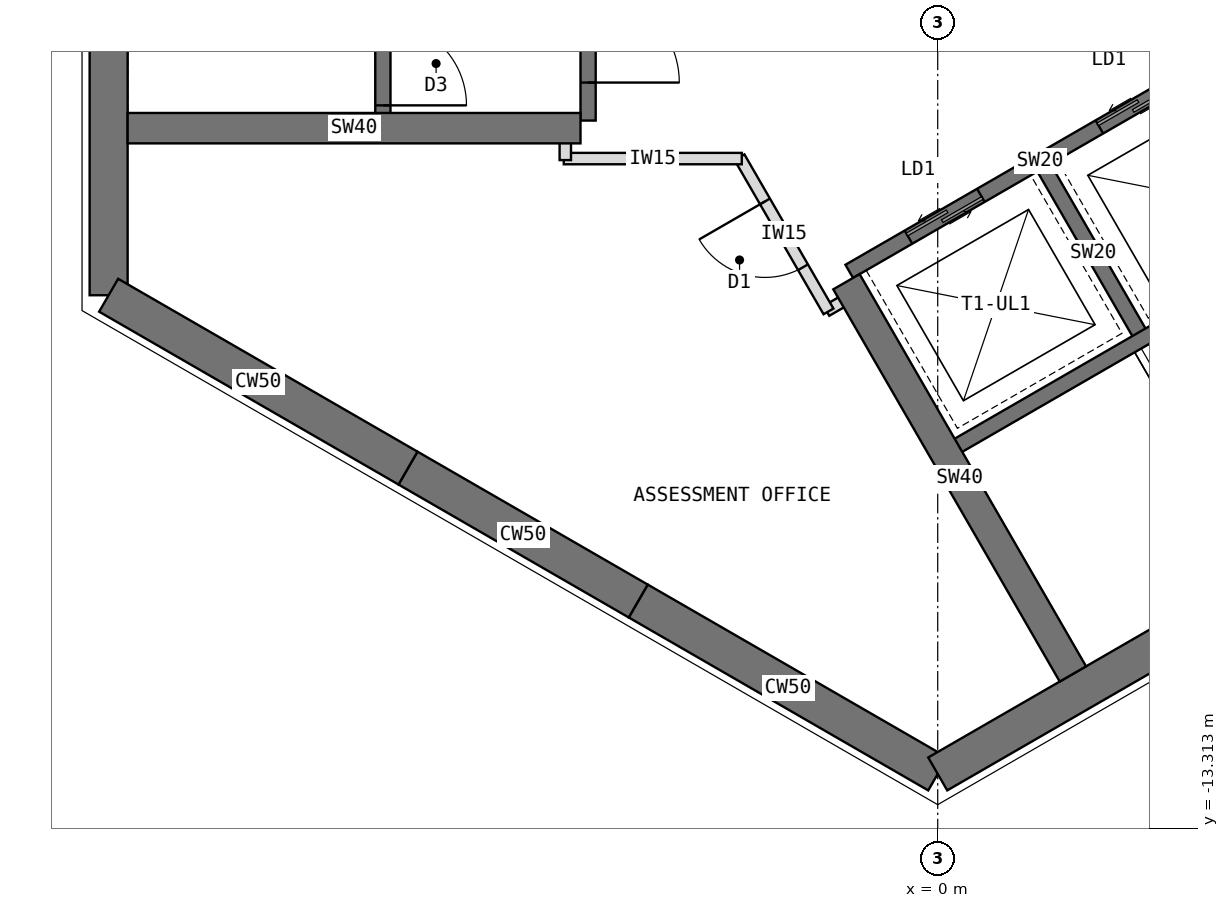
"""IFC4 building model, lengths in metres.
Left out: names, types, materials, properties, quantities, classifications, styles, units other than length and angle.
Written with IfcOpenShell. Run it as: python <this file> out.ifc"""

import sys

from ifc_helpers import new_model, si_unit, direction, frame, frame_2d, origin, place, context, subcontext, project, spatial, rectangle, extrude, element, fill, save


model = new_model("IFC4")
c1 = context("Model", 3, precision=1e-05, world=origin(), true_north=direction((0.0, 1.0)))
c2 = subcontext(c1, "Body", "Model", "MODEL_VIEW")
j1 = project(units=[si_unit("LENGTHUNIT", "METRE"), si_unit("PLANEANGLEUNIT", "RADIAN")], contexts=[c1])
p1 = place(None, origin())
s1 = spatial("IfcSite", under=j1, at=p1, CompositionType="ELEMENT")
p2 = place(p1, origin())
s2 = spatial("IfcBuilding", under=s1, at=p2, CompositionType="ELEMENT")
p3 = place(p2, frame((0.0, 0.0, 218.5)))
s3 = spatial("IfcBuildingStorey", under=s2, at=p3, CompositionType="ELEMENT", Elevation=218.5)
p4 = place(p3, frame((-10.908, 6.298, 0.0), z_axis=(0.0, 0.0, 1.0), x_axis=(0.0, -1.0, 0.0)))
e1 = element("IfcWall", 1, at=p4, inside=s3, PredefinedType="SHEAR", context=c2, shape_type="SweptSolid", body=[
    extrude(rectangle(XDim=12.596, YDim=0.5, at=frame_2d((6.298, 0.0))), origin(), (0.0, 0.0, 1.0), 4.0),
])
p5 = place(p3, frame((-10.908, -6.298, 0.0), z_axis=(0.0, 0.0, 1.0), x_axis=(0.866034513004, -0.499984222037, 0.0)))
e2 = element("IfcWall", 2, at=p5, inside=s3, PredefinedType="SHEAR", context=c2, shape_type="SweptSolid", body=[
    extrude(rectangle(XDim=4.548, YDim=0.5, at=frame_2d((2.274, 0.0))), origin(), (0.0, 0.0, 1.0), 4.0),
])
p6 = place(p3, frame((-6.97, -8.572, 0.0), z_axis=(0.0, 0.0, 1.0), x_axis=(0.866019471182, -0.500010275428, 0.0)))
e3 = element("IfcWall", 3, at=p6, inside=s3, PredefinedType="SHEAR", context=c2, shape_type="SweptSolid", body=[
    extrude(rectangle(XDim=3.5, YDim=0.5, at=frame_2d((1.75, 0.0))), origin(), (0.0, 0.0, 1.0), 4.0),
])
p7 = place(p3, frame((-3.939, -10.322, 0.0), z_axis=(0.0, 0.0, 1.0), x_axis=(0.866011268655, -0.500024481964, 0.0)))
e4 = element("IfcWall", 4, at=p7, inside=s3, PredefinedType="SHEAR", context=c2, shape_type="SweptSolid", body=[
    extrude(rectangle(XDim=4.548, YDim=0.5, at=frame_2d((2.274, 0.0))), origin(), (0.0, 0.0, 1.0), 4.0),
])
p8 = place(p3, frame((0.0, -12.596, 0.0), z_axis=(0.0, 0.0, 1.0), x_axis=(0.866021940709, 0.500005998175, 0.0)))
e5 = element("IfcWall", 5, at=p8, inside=s3, PredefinedType="SHEAR", context=c2, shape_type="SweptSolid", body=[
    extrude(rectangle(XDim=12.596, YDim=0.5, at=frame_2d((6.298, 0.0))), origin(), (0.0, 0.0, 1.0), 4.0),
])
p9 = place(p3, frame((-4.6, 4.0, 0.0), z_axis=(0.0, 0.0, 1.0), x_axis=(0.0, -1.0, 0.0)))
e6 = element("IfcWall", 6, at=p9, inside=s3, PredefinedType="SHEAR", context=c2, shape_type="SweptSolid", body=[
    extrude(rectangle(XDim=8.0, YDim=0.2, at=frame_2d((4.0, 0.0))), origin(), (0.0, 0.0, 1.0), 4.0),
])
p10 = place(p9, frame((6.3, 0.0, 0.0)))
e7 = element("IfcOpeningElement", 7, at=p10, cuts=e6, PredefinedType="OPENING", context=c2, shape_type="SweptSolid", body=[
    extrude(rectangle(XDim=1.2, YDim=2.1, at=frame_2d((0.6, 1.05))), frame((0.0, 0.11, 0.0), z_axis=(0.0, -1.0, 0.0), x_axis=(1.0, 0.0, 0.0)), (0.0, 0.0, 1.0), 0.22),
])
p11 = place(p9, frame((0.9, 0.0, 0.0)))
e8 = element("IfcOpeningElement", 8, at=p11, cuts=e6, PredefinedType="OPENING", context=c2, shape_type="SweptSolid", body=[
    extrude(rectangle(XDim=1.1, YDim=2.2, at=frame_2d((0.55, 1.1))), frame((0.0, 0.11, 0.0), z_axis=(0.0, -1.0, 0.0), x_axis=(1.0, 0.0, 0.0)), (0.0, 0.0, 1.0), 0.22),
])
p12 = place(p3, frame((-7.3, 4.0, 0.0), z_axis=(0.0, 0.0, 1.0), x_axis=(0.0, -1.0, 0.0)))
e9 = element("IfcWall", 9, at=p12, inside=s3, PredefinedType="SHEAR", context=c2, shape_type="SweptSolid", body=[
    extrude(rectangle(XDim=8.0, YDim=0.2, at=frame_2d((4.0, 0.0))), origin(), (0.0, 0.0, 1.0), 4.0),
])
p13 = place(p12, frame((6.7, 0.0, 0.0)))
e10 = element("IfcOpeningElement", 10, at=p13, cuts=e9, PredefinedType="OPENING", context=c2, shape_type="SweptSolid", body=[
    extrude(rectangle(XDim=1.1, YDim=2.1, at=frame_2d((0.55, 1.05))), frame((0.0, 0.11, 0.0), z_axis=(0.0, -1.0, 0.0), x_axis=(1.0, 0.0, 0.0)), (0.0, 0.0, 1.0), 0.22),
])
p14 = place(p3, frame((-4.7, -4.1, 0.0), z_axis=(0.0, 0.0, 1.0), x_axis=(-1.0, 0.0, 0.0)))
e11 = element("IfcWall", 11, at=p14, inside=s3, PredefinedType="SHEAR", context=c2, shape_type="SweptSolid", body=[
    extrude(rectangle(XDim=5.958, YDim=0.4, at=frame_2d((2.979, 0.0))), origin(), (0.0, 0.0, 1.0), 4.0),
])
p15 = place(p3, frame((-1.164, -5.984, 0.0), z_axis=(0.0, 0.0, 1.0), x_axis=(0.866026010844, 0.49999894854, 0.0)))
e12 = element("IfcWall", 12, at=p15, inside=s3, PredefinedType="SHEAR", context=c2, shape_type="SweptSolid", body=[
    extrude(rectangle(XDim=8.0, YDim=0.2, at=frame_2d((4.0, 0.0))), origin(), (0.0, 0.0, 1.0), 4.0),
])
p16 = place(p15, frame((6.3, 0.0, 0.0)))
e13 = element("IfcOpeningElement", 13, at=p16, cuts=e12, PredefinedType="OPENING", context=c2, shape_type="SweptSolid", body=[
    extrude(rectangle(XDim=1.2, YDim=2.1, at=frame_2d((0.6, 1.05))), frame((0.0, 0.11, 0.0), z_axis=(0.0, -1.0, 0.0), x_axis=(1.0, 0.0, 0.0)), (0.0, 0.0, 1.0), 0.22),
])
p17 = place(p15, frame((0.9, 0.0, 0.0)))
e14 = element("IfcOpeningElement", 14, at=p17, cuts=e12, PredefinedType="OPENING", context=c2, shape_type="SweptSolid", body=[
    extrude(rectangle(XDim=1.1, YDim=2.2, at=frame_2d((0.55, 1.1))), frame((0.0, 0.11, 0.0), z_axis=(0.0, -1.0, 0.0), x_axis=(1.0, 0.0, 0.0)), (0.0, 0.0, 1.0), 0.22),
])
p18 = place(p15, frame((3.8, 0.0, 0.0)))
e15 = element("IfcOpeningElement", 15, at=p18, cuts=e12, PredefinedType="OPENING", context=c2, shape_type="SweptSolid", body=[
    extrude(rectangle(XDim=1.1, YDim=2.2, at=frame_2d((0.55, 1.1))), frame((0.0, 0.11, 0.0), z_axis=(0.0, -1.0, 0.0), x_axis=(1.0, 0.0, 0.0)), (0.0, 0.0, 1.0), 0.22),
])
p19 = place(p3, frame((1.397, -4.62, 0.0), z_axis=(0.0, 0.0, 1.0), x_axis=(0.499936506574, -0.866062058628, 0.0)))
e16 = element("IfcWall", 16, at=p19, inside=s3, PredefinedType="SHEAR", context=c2, shape_type="SweptSolid", body=[
    extrude(rectangle(XDim=2.6, YDim=0.2, at=frame_2d((1.3, 0.0))), origin(), (0.0, 0.0, 1.0), 4.0),
])
p20 = place(p3, frame((0.186, -8.322, 0.0), z_axis=(0.0, 0.0, 1.0), x_axis=(0.866026010844, 0.49999894854, 0.0)))
e17 = element("IfcWall", 17, at=p20, inside=s3, PredefinedType="SHEAR", context=c2, shape_type="SweptSolid", body=[
    extrude(rectangle(XDim=8.0, YDim=0.2, at=frame_2d((4.0, 0.0))), origin(), (0.0, 0.0, 1.0), 4.0),
])
p21 = place(p20, frame((6.7, 0.0, 0.0)))
e18 = element("IfcOpeningElement", 18, at=p21, cuts=e17, PredefinedType="OPENING", context=c2, shape_type="SweptSolid", body=[
    extrude(rectangle(XDim=1.1, YDim=2.1, at=frame_2d((0.55, 1.05))), frame((0.0, 0.11, 0.0), z_axis=(0.0, -1.0, 0.0), x_axis=(1.0, 0.0, 0.0)), (0.0, 0.0, 1.0), 0.22),
])
p22 = place(p3, frame((-1.201, -6.12, 0.0), z_axis=(0.0, 0.0, 1.0), x_axis=(0.500021575205, -0.866012946976, 0.0)))
e19 = element("IfcWall", 19, at=p22, inside=s3, PredefinedType="SHEAR", context=c2, shape_type="SweptSolid", body=[
    extrude(rectangle(XDim=5.958, YDim=0.4, at=frame_2d((2.979, 0.0))), origin(), (0.0, 0.0, 1.0), 4.0),
])
p23 = place(p3, frame((-1.092, -6.289, 0.0), z_axis=(0.0, 0.0, 1.0), x_axis=(-0.866138304741, -0.499804398801, 0.0)))
e20 = element("IfcWall", 20, at=p23, inside=s3, PredefinedType="PARTITIONING", context=c2, shape_type="SweptSolid", body=[
    extrude(rectangle(XDim=0.43, YDim=0.15, at=frame_2d((0.215, 0.0))), origin(), (0.0, 0.0, 1.0), 3.8),
])
p24 = place(p3, frame((-1.437, -6.511, 0.0), z_axis=(0.0, 0.0, 1.0), x_axis=(-0.500074377092, 0.865982457891, 0.0)))
e21 = element("IfcWall", 21, at=p24, inside=s3, PredefinedType="PARTITIONING", context=c2, shape_type="SweptSolid", body=[
    extrude(rectangle(XDim=2.342, YDim=0.15, at=frame_2d((1.171, 0.0))), origin(), (0.0, 0.0, 1.0), 3.8),
])
p25 = place(p24, frame((0.671, 0.0, 0.0)))
e22 = element("IfcOpeningElement", 22, at=p25, cuts=e21, PredefinedType="OPENING", context=c2, shape_type="SweptSolid", body=[
    extrude(rectangle(XDim=1.0, YDim=2.1, at=frame_2d((0.5, 1.05))), frame((0.0, 0.085, 0.0), z_axis=(0.0, -1.0, 0.0), x_axis=(1.0, 0.0, 0.0)), (0.0, 0.0, 1.0), 0.17),
])
p26 = place(p3, frame((-2.578, -4.5, 0.0), z_axis=(0.0, 0.0, 1.0), x_axis=(-1.0, 0.0, 0.0)))
e23 = element("IfcWall", 23, at=p26, inside=s3, PredefinedType="PARTITIONING", context=c2, shape_type="SweptSolid", body=[
    extrude(rectangle(XDim=2.342, YDim=0.15, at=frame_2d((1.171, 0.0))), origin(), (0.0, 0.0, 1.0), 3.8),
])
p27 = place(p3, frame((-4.9, -4.52, 0.0), z_axis=(0.0, 0.0, 1.0), x_axis=(0.0, 1.0, 0.0)))
e24 = element("IfcWall", 24, at=p27, inside=s3, PredefinedType="PARTITIONING", context=c2, shape_type="SweptSolid", body=[
    extrude(rectangle(XDim=0.43, YDim=0.15, at=frame_2d((0.215, 0.0))), origin(), (0.0, 0.0, 1.0), 3.8),
])
p28 = place(p10, origin())
e25 = element("IfcDoor", 25, at=p28, inside=s3, OperationType="SINGLE_SWING_RIGHT", PredefinedType="DOOR", context=c2, shape_type="SweptSolid", body=[
    extrude(rectangle(XDim=1.2, YDim=2.1, at=frame_2d((0.6, 1.05))), frame((0.0, 0.025, 0.0), z_axis=(0.0, -1.0, 0.0), x_axis=(1.0, 0.0, 0.0)), (0.0, 0.0, 1.0), 0.05),
])
fill(e7, e25)
p29 = place(p13, origin())
e26 = element("IfcDoor", 26, at=p29, inside=s3, OperationType="SINGLE_SWING_RIGHT", PredefinedType="DOOR", context=c2, shape_type="SweptSolid", body=[
    extrude(rectangle(XDim=1.1, YDim=2.1, at=frame_2d((0.55, 1.05))), frame((0.0, 0.025, 0.0), z_axis=(0.0, -1.0, 0.0), x_axis=(1.0, 0.0, 0.0)), (0.0, 0.0, 1.0), 0.05),
])
fill(e10, e26)
p30 = place(p17, origin())
e27 = element("IfcDoor", 27, at=p30, inside=s3, OperationType="DOUBLE_DOOR_SLIDING", PredefinedType="DOOR", context=c2, shape_type="SweptSolid", body=[
    extrude(rectangle(XDim=1.1, YDim=2.2, at=frame_2d((0.55, 1.1))), frame((0.0, 0.025, 0.0), z_axis=(0.0, -1.0, 0.0), x_axis=(1.0, 0.0, 0.0)), (0.0, 0.0, 1.0), 0.05),
])
fill(e14, e27)
p31 = place(p18, origin())
e28 = element("IfcDoor", 28, at=p31, inside=s3, OperationType="DOUBLE_DOOR_SLIDING", PredefinedType="DOOR", context=c2, shape_type="SweptSolid", body=[
    extrude(rectangle(XDim=1.1, YDim=2.2, at=frame_2d((0.55, 1.1))), frame((0.0, 0.025, 0.0), z_axis=(0.0, -1.0, 0.0), x_axis=(1.0, 0.0, 0.0)), (0.0, 0.0, 1.0), 0.05),
])
fill(e15, e28)
p32 = place(p25, origin())
e29 = element("IfcDoor", 29, at=p32, inside=s3, OperationType="SINGLE_SWING_RIGHT", PredefinedType="DOOR", context=c2, shape_type="SweptSolid", body=[
    extrude(rectangle(XDim=1.0, YDim=2.1, at=frame_2d((0.5, 1.05))), frame((0.0, 0.025, 0.0), z_axis=(0.0, -1.0, 0.0), x_axis=(1.0, 0.0, 0.0)), (0.0, 0.0, 1.0), 0.05),
])
fill(e22, e29)
save(model, sys.argv[1])
